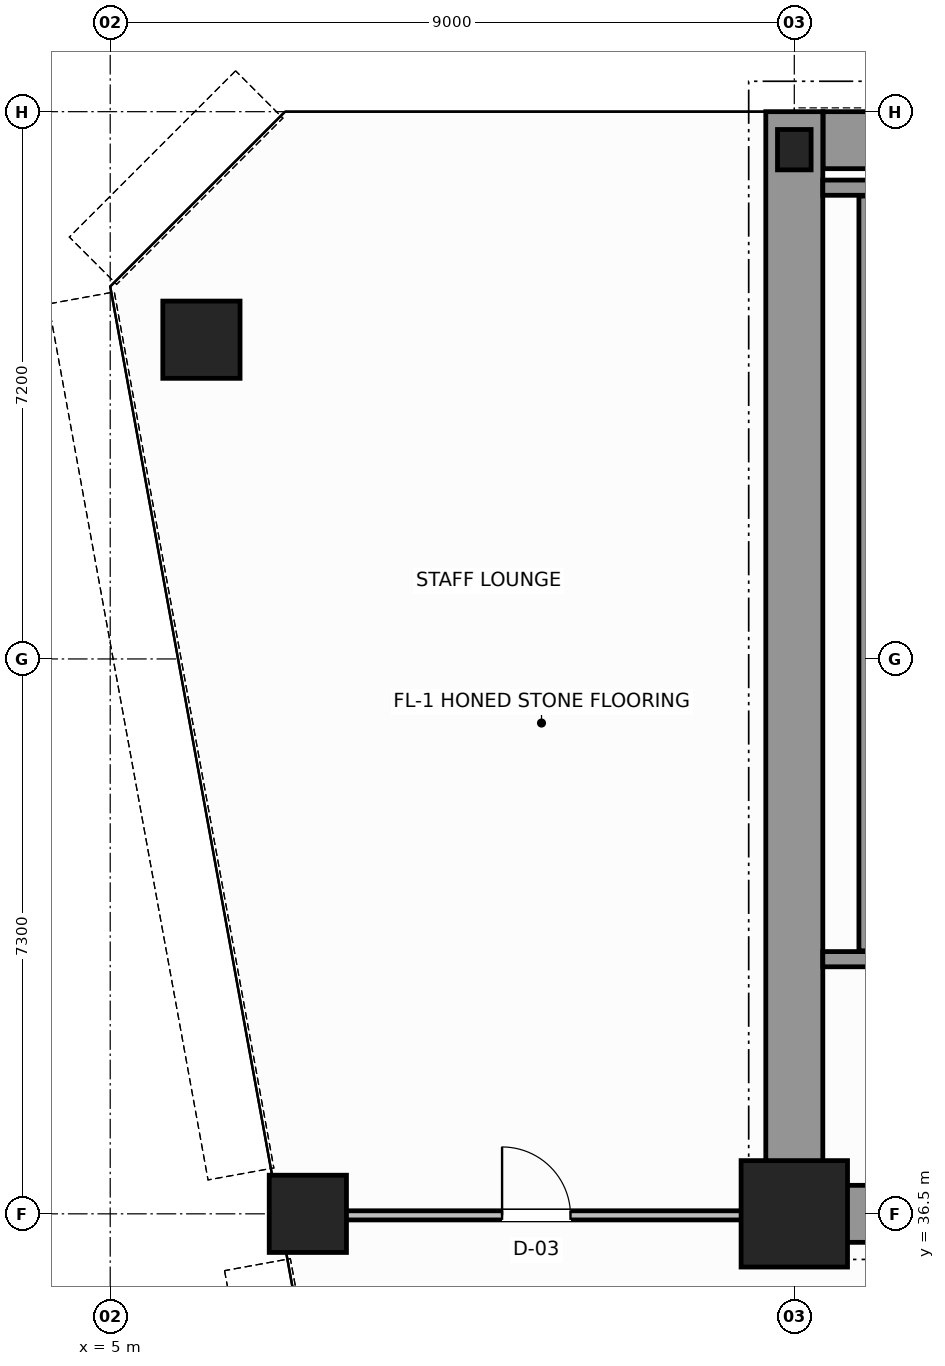
"""IFC4 building model, lengths in metres.
Left out: names, types, materials, properties, quantities, classifications, styles, units other than length and angle.
Written with IfcOpenShell. Run it as: python <this file> out.ifc"""

import sys

from ifc_helpers import new_model, si_unit, direction, frame, frame_2d, origin, origin_2d, place, context, subcontext, project, spatial, rectangle, hollow_circle, i_section, extrude, source, transform, mapped, element, fill, save


model = new_model("IFC4")
c1 = context("Model", 3, precision=1e-05, world=origin(), true_north=direction((0.0, 1.0)))
c2 = subcontext(c1, "Body", "Model", "MODEL_VIEW")
j1 = project(units=[si_unit("LENGTHUNIT", "METRE"), si_unit("PLANEANGLEUNIT", "RADIAN")], contexts=[c1])
p1 = place(None, origin())
s1 = spatial("IfcSite", under=j1, at=p1, CompositionType="ELEMENT")
p2 = place(p1, origin())
s2 = spatial("IfcBuilding", under=s1, at=p2, CompositionType="ELEMENT")
p3 = place(p2, frame((0.0, 0.0, 111.0)))
s3 = spatial("IfcBuildingStorey", under=s2, at=p3, CompositionType="ELEMENT", Elevation=111.0)
m1 = source(origin(), c2, "Body", "SweptSolid", [
    extrude(rectangle(XDim=1.4, YDim=1.4, at=origin_2d()), origin(), (0.0, 0.0, 1.0), 3.8),
])
p4 = place(p3, frame((14.0, 36.5, 0.0), z_axis=(0.0, 0.0, 1.0), x_axis=(1.0, 0.0, 0.0)))
e1 = element("IfcColumn", 1, at=p4, inside=s3, PredefinedType="COLUMN", context=c2, shape_type="MappedRepresentation", body=[
    mapped(m1, transform((0.0, 0.0, 0.0), scale=1.0)),
])
m2 = source(origin(), c2, "Body", "SweptSolid", [
    extrude(i_section(OverallWidth=0.442, OverallDepth=0.531, WebThickness=0.065, FlangeThickness=0.076, FilletRadius=0.015, at=origin_2d()), origin(), (0.0, 0.0, 1.0), 3.8),
])
p5 = place(p3, frame((14.0, 50.5, 0.0), z_axis=(0.0, 0.0, 1.0), x_axis=(1.0, 0.0, 0.0)))
e2 = element("IfcColumn", 2, at=p5, inside=s3, PredefinedType="COLUMN", context=c2, shape_type="MappedRepresentation", body=[
    mapped(m2, transform((0.0, 0.0, 0.0), scale=1.0)),
])
m3 = source(origin(), c2, "Body", "SweptSolid", [
    extrude(hollow_circle(Radius=0.508, WallThickness=0.045, at=origin_2d()), origin(), (0.0, 0.0, 1.0), 3.8),
])
for number, where, z_axis, x_axis in (
    (3, (6.2, 48.0, 0.0), (0.0, 0.0, 1.0), (1.0, 0.0, 0.0)),
    (4, (7.6, 36.5, 0.0), (0.0, 0.0, 1.0), (1.0, 0.0, 0.0)),
):
    element("IfcColumn", number, at=place(p3, frame(where, z_axis=z_axis, x_axis=x_axis)), inside=s3, PredefinedType="COLUMN", context=c2, shape_type="MappedRepresentation", body=[
        mapped(m3, transform((0.0, 0.0, 0.0), scale=1.0)),
    ])
p6 = place(p3, frame((14.379, 50.625, 0.0), z_axis=(0.0, 0.0, 1.0), x_axis=(1.0, 0.0, 0.0)))
e5 = element("IfcWall", 5, at=p6, inside=s3, PredefinedType="SHEAR", context=c2, shape_type="SweptSolid", body=[
    extrude(rectangle(XDim=19.619, YDim=0.75, at=frame_2d((9.81, 0.0))), origin(), (0.0, 0.0, 1.0), 3.8),
])
p7 = place(p3, frame((14.0, 36.5, 0.0), z_axis=(0.0, 0.0, 1.0), x_axis=(0.0, 1.0, 0.0)))
e6 = element("IfcWall", 6, at=p7, inside=s3, PredefinedType="SHEAR", context=c2, shape_type="SweptSolid", body=[
    extrude(rectangle(XDim=14.5, YDim=0.75, at=frame_2d((7.25, 0.0))), origin(), (0.0, 0.0, 1.0), 3.8),
])
p8 = place(p3, frame((14.395, 36.5, 0.0), z_axis=(0.0, 0.0, 1.0), x_axis=(1.0, 0.0, 0.0)))
e7 = element("IfcWall", 7, at=p8, inside=s3, PredefinedType="SHEAR", context=c2, shape_type="SweptSolid", body=[
    extrude(rectangle(XDim=3.805, YDim=0.75, at=frame_2d((1.902, 0.0))), origin(), (0.0, 0.0, 1.0), 2.38),
])
p9 = place(p3, frame((14.375, 39.85, 0.0), z_axis=(0.0, 0.0, 1.0), x_axis=(1.0, 0.0, 0.0)))
e8 = element("IfcWall", 8, at=p9, inside=s3, PredefinedType="SOLIDWALL", context=c2, shape_type="SweptSolid", body=[
    extrude(rectangle(XDim=4.225, YDim=0.2, at=frame_2d((2.113, 0.0))), origin(), (0.0, 0.0, 1.0), 3.8),
])
p10 = place(p9, frame((1.8, 0.0, 0.0)))
e9 = element("IfcOpeningElement", 9, at=p10, cuts=e8, PredefinedType="OPENING", context=c2, shape_type="SweptSolid", body=[
    extrude(rectangle(XDim=1.1, YDim=2.15, at=frame_2d((0.55, 1.075))), frame((0.0, 0.11, 0.0), z_axis=(0.0, -1.0, 0.0), x_axis=(1.0, 0.0, 0.0)), (0.0, 0.0, 1.0), 0.22),
])
p11 = place(p3, frame((14.375, 50.0, 0.0), z_axis=(0.0, 0.0, 1.0), x_axis=(1.0, 0.0, 0.0)))
e10 = element("IfcWall", 10, at=p11, inside=s3, PredefinedType="SOLIDWALL", context=c2, shape_type="SweptSolid", body=[
    extrude(rectangle(XDim=4.225, YDim=0.2, at=frame_2d((2.113, 0.0))), origin(), (0.0, 0.0, 1.0), 3.8),
])
p12 = place(p3, frame((14.95, 39.96, 0.0), z_axis=(0.0, 0.0, 1.0), x_axis=(0.0, 1.0, 0.0)))
e11 = element("IfcWall", 11, at=p12, inside=s3, PredefinedType="SOLIDWALL", context=c2, shape_type="SweptSolid", body=[
    extrude(rectangle(XDim=9.93, YDim=0.2, at=frame_2d((4.965, 0.0))), origin(), (0.0, 0.0, 1.0), 3.8),
])
p13 = place(p3, frame((7.271, 36.48, 0.0), z_axis=(0.0, 0.0, 1.0), x_axis=(1.0, 0.0, 0.0)))
e12 = element("IfcWall", 12, at=p13, inside=s3, PredefinedType="PARTITIONING", context=c2, shape_type="SweptSolid", body=[
    extrude(rectangle(XDim=6.668, YDim=0.12, at=frame_2d((3.334, 0.0))), origin(), (0.0, 0.0, 1.0), 2.87),
])
p14 = place(p13, frame((2.884, 0.0, 0.0)))
e13 = element("IfcOpeningElement", 13, at=p14, cuts=e12, PredefinedType="OPENING", context=c2, shape_type="SweptSolid", body=[
    extrude(rectangle(XDim=0.9, YDim=2.15, at=frame_2d((0.45, 1.075))), frame((0.0, 0.07, 0.0), z_axis=(0.0, -1.0, 0.0), x_axis=(1.0, 0.0, 0.0)), (0.0, 0.0, 1.0), 0.14),
])
m4 = source(origin(), c2, "Body", "SweptSolid", [
    extrude(rectangle(XDim=0.9, YDim=2.15, at=frame_2d((0.45, 1.075))), frame((0.0, 0.025, 0.0), z_axis=(0.0, -1.0, 0.0), x_axis=(1.0, 0.0, 0.0)), (0.0, 0.0, 1.0), 0.05),
])
p15 = place(p14, origin())
e14 = element("IfcDoor", 14, at=p15, inside=s3, OperationType="SINGLE_SWING_LEFT", PredefinedType="DOOR", context=c2, shape_type="MappedRepresentation", body=[
    mapped(m4, transform((0.0, 0.0, 0.0), scale=1.0)),
])
fill(e13, e14)
save(model, sys.argv[1])
